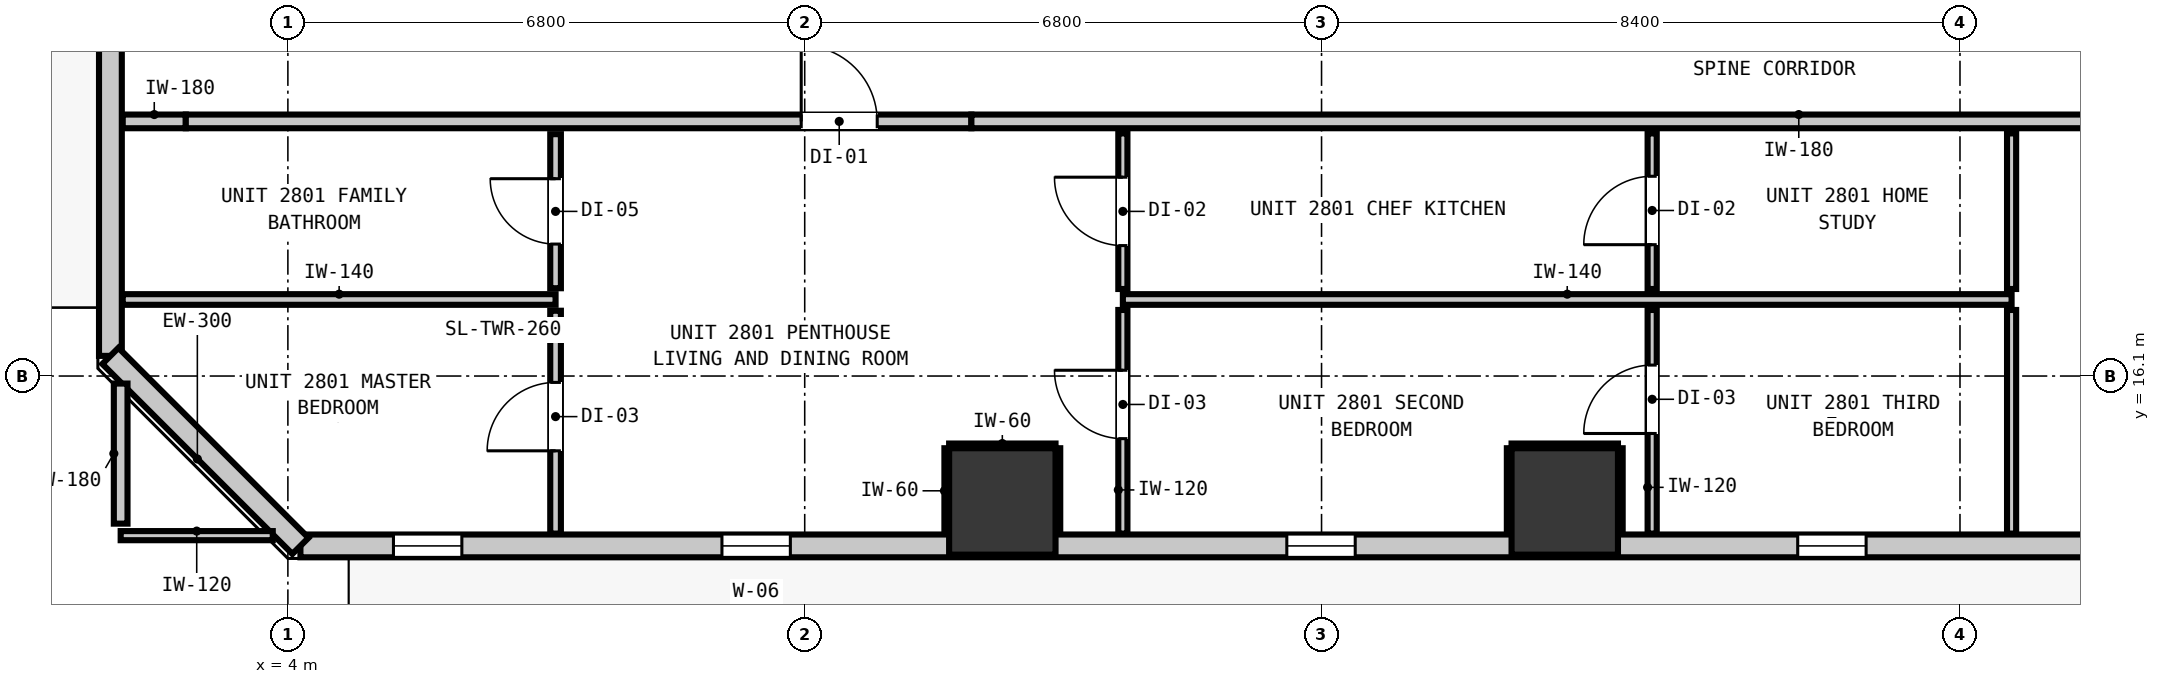
"""IFC4 building model, lengths in metres.
Left out: names, types, materials, properties, quantities, classifications, styles, units other than length and angle.
Written with IfcOpenShell. Run it as: python <this file> out.ifc"""

import sys

from ifc_helpers import new_model, si_unit, direction, frame, frame_2d, origin, origin_2d, place, context, subcontext, project, spatial, rectangle, extrude, element, fill, save


model = new_model("IFC4")
c1 = context("Model", 3, precision=1e-05, world=origin(), true_north=direction((0.0, 1.0)))
c2 = subcontext(c1, "Body", "Model", "MODEL_VIEW")
j1 = project(units=[si_unit("LENGTHUNIT", "METRE"), si_unit("PLANEANGLEUNIT", "RADIAN")], contexts=[c1])
p1 = place(None, origin())
s1 = spatial("IfcSite", under=j1, at=p1, CompositionType="ELEMENT")
p2 = place(p1, origin())
s2 = spatial("IfcBuilding", under=s1, at=p2, CompositionType="ELEMENT")
p3 = place(p2, frame((0.0, 0.0, 99.44)))
s3 = spatial("IfcBuildingStorey", under=s2, at=p3, CompositionType="ELEMENT", Elevation=99.44)
for number, where, z_axis, x_axis in (
    (1, (13.4, 14.45, 0.0), (0.0, 0.0, 1.0), (1.0, 0.0, 0.0)),
    (2, (20.8, 14.45, 0.0), (0.0, 0.0, 1.0), (1.0, 0.0, 0.0)),
):
    element("IfcColumn", number, at=place(p3, frame(where, z_axis=z_axis, x_axis=x_axis)), inside=s3, PredefinedType="COLUMN", context=c2, shape_type="SweptSolid", body=[
        extrude(rectangle(XDim=1.4, YDim=1.4, at=origin_2d()), origin(), (0.0, 0.0, 1.0), 3.32),
    ])
p4 = place(p3, frame((1.665, 16.365, 0.0), z_axis=(0.0, 0.0, 1.0), x_axis=(0.0, 1.0, 0.0)))
e3 = element("IfcWall", 3, at=p4, inside=s3, PredefinedType="STANDARD", context=c2, shape_type="SweptSolid", body=[
    extrude(rectangle(XDim=34.67, YDim=0.3, at=frame_2d((17.335, 0.0))), origin(), (0.0, 0.0, 1.0), 3.06),
])
p5 = place(p4, frame((8.955, 0.0, 0.0)))
e4 = element("IfcOpeningElement", 4, at=p5, cuts=e3, PredefinedType="OPENING", context=c2, shape_type="SweptSolid", body=[
    extrude(rectangle(XDim=1.0, YDim=2.15, at=frame_2d((0.5, 1.075))), frame((0.0, 0.16, 0.0), z_axis=(0.0, -1.0, 0.0), x_axis=(1.0, 0.0, 0.0)), (0.0, 0.0, 1.0), 0.32),
])
p6 = place(p4, frame((31.033, 0.0, 0.85)))
e5 = element("IfcOpeningElement", 5, at=p6, cuts=e3, PredefinedType="OPENING", context=c2, shape_type="SweptSolid", body=[
    extrude(rectangle(XDim=0.9, YDim=1.5, at=frame_2d((0.45, 0.75))), frame((0.0, 0.16, 0.0), z_axis=(0.0, -1.0, 0.0), x_axis=(1.0, 0.0, 0.0)), (0.0, 0.0, 1.0), 0.32),
])
p7 = place(p4, frame((10.955, 0.0, 0.85)))
e6 = element("IfcOpeningElement", 6, at=p7, cuts=e3, PredefinedType="OPENING", context=c2, shape_type="SweptSolid", body=[
    extrude(rectangle(XDim=0.9, YDim=1.5, at=frame_2d((0.45, 0.75))), frame((0.0, 0.16, 0.0), z_axis=(0.0, -1.0, 0.0), x_axis=(1.0, 0.0, 0.0)), (0.0, 0.0, 1.0), 0.32),
])
p8 = place(p4, frame((15.485, 0.0, 0.85)))
e7 = element("IfcOpeningElement", 7, at=p8, cuts=e3, PredefinedType="OPENING", context=c2, shape_type="SweptSolid", body=[
    extrude(rectangle(XDim=0.9, YDim=1.5, at=frame_2d((0.45, 0.75))), frame((0.0, 0.16, 0.0), z_axis=(0.0, -1.0, 0.0), x_axis=(1.0, 0.0, 0.0)), (0.0, 0.0, 1.0), 0.32),
])
p9 = place(p3, frame((41.635, 13.865, 0.0), z_axis=(0.0, 0.0, 1.0), x_axis=(-1.0, 0.0, 0.0)))
e8 = element("IfcWall", 8, at=p9, inside=s3, PredefinedType="STANDARD", context=c2, shape_type="SweptSolid", body=[
    extrude(rectangle(XDim=37.47, YDim=0.3, at=frame_2d((18.735, 0.0))), origin(), (0.0, 0.0, 1.0), 3.06),
])
p10 = place(p9, frame((0.901, 0.0, 0.0)))
e9 = element("IfcOpeningElement", 9, at=p10, cuts=e8, PredefinedType="OPENING", context=c2, shape_type="SweptSolid", body=[
    extrude(rectangle(XDim=1.0, YDim=2.15, at=frame_2d((0.5, 1.075))), frame((0.0, 0.16, 0.0), z_axis=(0.0, -1.0, 0.0), x_axis=(1.0, 0.0, 0.0)), (0.0, 0.0, 1.0), 0.32),
])
p11 = place(p9, frame((31.024, 0.0, 0.85)))
e10 = element("IfcOpeningElement", 10, at=p11, cuts=e8, PredefinedType="OPENING", context=c2, shape_type="SweptSolid", body=[
    extrude(rectangle(XDim=0.9, YDim=1.5, at=frame_2d((0.45, 0.75))), frame((0.0, 0.16, 0.0), z_axis=(0.0, -1.0, 0.0), x_axis=(1.0, 0.0, 0.0)), (0.0, 0.0, 1.0), 0.32),
])
p12 = place(p9, frame((35.346, 0.0, 0.85)))
e11 = element("IfcOpeningElement", 11, at=p12, cuts=e8, PredefinedType="OPENING", context=c2, shape_type="SweptSolid", body=[
    extrude(rectangle(XDim=0.9, YDim=1.5, at=frame_2d((0.45, 0.75))), frame((0.0, 0.16, 0.0), z_axis=(0.0, -1.0, 0.0), x_axis=(1.0, 0.0, 0.0)), (0.0, 0.0, 1.0), 0.32),
])
p13 = place(p9, frame((23.592, 0.0, 0.85)))
e12 = element("IfcOpeningElement", 12, at=p13, cuts=e8, PredefinedType="OPENING", context=c2, shape_type="SweptSolid", body=[
    extrude(rectangle(XDim=0.9, YDim=1.5, at=frame_2d((0.45, 0.75))), frame((0.0, 0.16, 0.0), z_axis=(0.0, -1.0, 0.0), x_axis=(1.0, 0.0, 0.0)), (0.0, 0.0, 1.0), 0.32),
])
p14 = place(p9, frame((16.87, 0.0, 0.85)))
e13 = element("IfcOpeningElement", 13, at=p14, cuts=e8, PredefinedType="OPENING", context=c2, shape_type="SweptSolid", body=[
    extrude(rectangle(XDim=0.9, YDim=1.5, at=frame_2d((0.45, 0.75))), frame((0.0, 0.16, 0.0), z_axis=(0.0, -1.0, 0.0), x_axis=(1.0, 0.0, 0.0)), (0.0, 0.0, 1.0), 0.32),
])
p15 = place(p9, frame((8.335, 0.0, 0.85)))
e14 = element("IfcOpeningElement", 14, at=p15, cuts=e8, PredefinedType="OPENING", context=c2, shape_type="SweptSolid", body=[
    extrude(rectangle(XDim=0.9, YDim=1.5, at=frame_2d((0.45, 0.75))), frame((0.0, 0.16, 0.0), z_axis=(0.0, -1.0, 0.0), x_axis=(1.0, 0.0, 0.0)), (0.0, 0.0, 1.0), 0.32),
])
p16 = place(p3, frame((4.165, 13.865, 0.0), z_axis=(0.0, 0.0, 1.0), x_axis=(-0.707106781187, 0.707106781187, 0.0)))
e15 = element("IfcWall", 15, at=p16, inside=s3, PredefinedType="STANDARD", context=c2, shape_type="SweptSolid", body=[
    extrude(rectangle(XDim=3.536, YDim=0.3, at=frame_2d((1.768, 0.0))), origin(), (0.0, 0.0, 1.0), 3.06),
])
p17 = place(p3, frame((1.827, 19.45, 0.0), z_axis=(0.0, 0.0, 1.0), x_axis=(1.0, 0.0, 0.0)))
e16 = element("IfcWall", 16, at=p17, inside=s3, PredefinedType="PARTITIONING", context=c2, shape_type="SweptSolid", body=[
    extrude(rectangle(XDim=0.83, YDim=0.18, at=frame_2d((0.415, 0.0))), origin(), (0.0, 0.0, 1.0), 3.06),
])
p18 = place(p3, frame((2.657, 19.45, 0.0), z_axis=(0.0, 0.0, 1.0), x_axis=(1.0, 0.0, 0.0)))
e17 = element("IfcWall", 17, at=p18, inside=s3, PredefinedType="PARTITIONING", context=c2, shape_type="SweptSolid", body=[
    extrude(rectangle(XDim=10.336, YDim=0.18, at=frame_2d((5.168, 0.0))), origin(), (0.0, 0.0, 1.0), 2.445),
])
p19 = place(p18, frame((8.097, 0.0, 0.0)))
e18 = element("IfcOpeningElement", 18, at=p19, cuts=e17, PredefinedType="OPENING", context=c2, shape_type="SweptSolid", body=[
    extrude(rectangle(XDim=1.0, YDim=2.15, at=frame_2d((0.5, 1.075))), frame((0.0, 0.1, 0.0), z_axis=(0.0, -1.0, 0.0), x_axis=(1.0, 0.0, 0.0)), (0.0, 0.0, 1.0), 0.2),
])
p20 = place(p3, frame((12.993, 19.45, 0.0), z_axis=(0.0, 0.0, 1.0), x_axis=(1.0, 0.0, 0.0)))
e19 = element("IfcWall", 19, at=p20, inside=s3, PredefinedType="PARTITIONING", context=c2, shape_type="SweptSolid", body=[
    extrude(rectangle(XDim=30.98, YDim=0.18, at=frame_2d((15.49, 0.0))), origin(), (0.0, 0.0, 1.0), 3.06),
])
p21 = place(p20, frame((21.872, 0.0, 0.0)))
e20 = element("IfcOpeningElement", 20, at=p21, cuts=e19, PredefinedType="OPENING", context=c2, shape_type="SweptSolid", body=[
    extrude(rectangle(XDim=0.9, YDim=2.1, at=frame_2d((0.45, 1.05))), frame((0.0, 0.1, 0.0), z_axis=(0.0, -1.0, 0.0), x_axis=(1.0, 0.0, 0.0)), (0.0, 0.0, 1.0), 0.2),
])
p22 = place(p3, frame((1.827, 17.107, 0.0), z_axis=(0.0, 0.0, 1.0), x_axis=(1.0, 0.0, 0.0)))
e21 = element("IfcWall", 21, at=p22, inside=s3, PredefinedType="PARTITIONING", context=c2, shape_type="SweptSolid", body=[
    extrude(rectangle(XDim=5.695, YDim=0.14, at=frame_2d((2.848, 0.0))), origin(), (0.0, 0.0, 1.0), 3.06),
])
p23 = place(p3, frame((14.986, 17.107, 0.0), z_axis=(0.0, 0.0, 1.0), x_axis=(1.0, 0.0, 0.0)))
e22 = element("IfcWall", 22, at=p23, inside=s3, PredefinedType="PARTITIONING", context=c2, shape_type="SweptSolid", body=[
    extrude(rectangle(XDim=11.693, YDim=0.14, at=frame_2d((5.846, 0.0))), origin(), (0.0, 0.0, 1.0), 3.06),
])
p24 = place(p3, frame((1.8, 14.0, 0.0), z_axis=(0.0, 0.0, 1.0), x_axis=(1.0, 0.0, 0.0)))
e23 = element("IfcWall", 23, at=p24, inside=s3, PredefinedType="PARTITIONING", context=c2, shape_type="SweptSolid", body=[
    extrude(rectangle(XDim=2.001, YDim=0.12, at=frame_2d((1.0, 0.0))), origin(), (0.0, 0.0, 1.0), 3.06),
])
p25 = place(p3, frame((1.8, 14.158, 0.0), z_axis=(0.0, 0.0, 1.0), x_axis=(0.0, 1.0, 0.0)))
e24 = element("IfcWall", 24, at=p25, inside=s3, PredefinedType="PARTITIONING", context=c2, shape_type="SweptSolid", body=[
    extrude(rectangle(XDim=1.843, YDim=0.18, at=frame_2d((0.921, 0.0))), origin(), (0.0, 0.0, 1.0), 3.06),
])
p26 = place(p3, frame((7.522, 14.027, 0.0), z_axis=(0.0, 0.0, 1.0), x_axis=(0.0, 1.0, 0.0)))
e25 = element("IfcWall", 25, at=p26, inside=s3, PredefinedType="PARTITIONING", context=c2, shape_type="SweptSolid", body=[
    extrude(rectangle(XDim=2.932, YDim=0.14, at=frame_2d((1.466, 0.0))), origin(), (0.0, 0.0, 1.0), 3.06),
])
p27 = place(p26, frame((1.089, 0.0, 0.0)))
e26 = element("IfcOpeningElement", 26, at=p27, cuts=e25, PredefinedType="OPENING", context=c2, shape_type="SweptSolid", body=[
    extrude(rectangle(XDim=0.9, YDim=2.1, at=frame_2d((0.45, 1.05))), frame((0.0, 0.08, 0.0), z_axis=(0.0, -1.0, 0.0), x_axis=(1.0, 0.0, 0.0)), (0.0, 0.0, 1.0), 0.16),
])
p28 = place(p3, frame((7.522, 17.255, 0.0), z_axis=(0.0, 0.0, 1.0), x_axis=(0.0, 1.0, 0.0)))
e27 = element("IfcWall", 27, at=p28, inside=s3, PredefinedType="PARTITIONING", context=c2, shape_type="SweptSolid", body=[
    extrude(rectangle(XDim=2.027, YDim=0.14, at=frame_2d((1.014, 0.0))), origin(), (0.0, 0.0, 1.0), 3.06),
])
p29 = place(p28, frame((0.581, 0.0, 0.0)))
e28 = element("IfcOpeningElement", 28, at=p29, cuts=e27, PredefinedType="OPENING", context=c2, shape_type="SweptSolid", body=[
    extrude(rectangle(XDim=0.86, YDim=2.02, at=frame_2d((0.43, 1.01))), frame((0.0, 0.08, 0.0), z_axis=(0.0, -1.0, 0.0), x_axis=(1.0, 0.0, 0.0)), (0.0, 0.0, 1.0), 0.16),
])
p30 = place(p3, frame((14.986, 14.027, 0.0), z_axis=(0.0, 0.0, 1.0), x_axis=(0.0, 1.0, 0.0)))
e29 = element("IfcWall", 29, at=p30, inside=s3, PredefinedType="PARTITIONING", context=c2, shape_type="SweptSolid", body=[
    extrude(rectangle(XDim=2.942, YDim=0.12, at=frame_2d((1.471, 0.0))), origin(), (0.0, 0.0, 1.0), 3.06),
])
p31 = place(p30, frame((1.249, 0.0, 0.0)))
e30 = element("IfcOpeningElement", 30, at=p31, cuts=e29, PredefinedType="OPENING", context=c2, shape_type="SweptSolid", body=[
    extrude(rectangle(XDim=0.9, YDim=2.1, at=frame_2d((0.45, 1.05))), frame((0.0, 0.07, 0.0), z_axis=(0.0, -1.0, 0.0), x_axis=(1.0, 0.0, 0.0)), (0.0, 0.0, 1.0), 0.14),
])
p32 = place(p3, frame((14.986, 17.245, 0.0), z_axis=(0.0, 0.0, 1.0), x_axis=(0.0, 1.0, 0.0)))
e31 = element("IfcWall", 31, at=p32, inside=s3, PredefinedType="PARTITIONING", context=c2, shape_type="SweptSolid", body=[
    extrude(rectangle(XDim=2.047, YDim=0.12, at=frame_2d((1.023, 0.0))), origin(), (0.0, 0.0, 1.0), 3.06),
])
p33 = place(p32, frame((0.571, 0.0, 0.0)))
e32 = element("IfcOpeningElement", 32, at=p33, cuts=e31, PredefinedType="OPENING", context=c2, shape_type="SweptSolid", body=[
    extrude(rectangle(XDim=0.9, YDim=2.1, at=frame_2d((0.45, 1.05))), frame((0.0, 0.07, 0.0), z_axis=(0.0, -1.0, 0.0), x_axis=(1.0, 0.0, 0.0)), (0.0, 0.0, 1.0), 0.14),
])
p34 = place(p3, frame((21.95, 14.027, 0.0), z_axis=(0.0, 0.0, 1.0), x_axis=(0.0, 1.0, 0.0)))
e33 = element("IfcWall", 33, at=p34, inside=s3, PredefinedType="PARTITIONING", context=c2, shape_type="SweptSolid", body=[
    extrude(rectangle(XDim=2.942, YDim=0.12, at=frame_2d((1.471, 0.0))), origin(), (0.0, 0.0, 1.0), 3.06),
])
p35 = place(p34, frame((1.317, 0.0, 0.0)))
e34 = element("IfcOpeningElement", 34, at=p35, cuts=e33, PredefinedType="OPENING", context=c2, shape_type="SweptSolid", body=[
    extrude(rectangle(XDim=0.9, YDim=2.1, at=frame_2d((0.45, 1.05))), frame((0.0, 0.07, 0.0), z_axis=(0.0, -1.0, 0.0), x_axis=(1.0, 0.0, 0.0)), (0.0, 0.0, 1.0), 0.14),
])
p36 = place(p3, frame((21.95, 17.245, 0.0), z_axis=(0.0, 0.0, 1.0), x_axis=(0.0, 1.0, 0.0)))
e35 = element("IfcWall", 35, at=p36, inside=s3, PredefinedType="PARTITIONING", context=c2, shape_type="SweptSolid", body=[
    extrude(rectangle(XDim=2.047, YDim=0.12, at=frame_2d((1.023, 0.0))), origin(), (0.0, 0.0, 1.0), 3.06),
])
p37 = place(p36, frame((0.583, 0.0, 0.0)))
e36 = element("IfcOpeningElement", 36, at=p37, cuts=e35, PredefinedType="OPENING", context=c2, shape_type="SweptSolid", body=[
    extrude(rectangle(XDim=0.9, YDim=2.1, at=frame_2d((0.45, 1.05))), frame((0.0, 0.07, 0.0), z_axis=(0.0, -1.0, 0.0), x_axis=(1.0, 0.0, 0.0)), (0.0, 0.0, 1.0), 0.14),
])
p38 = place(p3, frame((26.679, 14.027, 0.0), z_axis=(0.0, 0.0, 1.0), x_axis=(0.0, 1.0, 0.0)))
e37 = element("IfcWall", 37, at=p38, inside=s3, PredefinedType="PARTITIONING", context=c2, shape_type="SweptSolid", body=[
    extrude(rectangle(XDim=2.942, YDim=0.12, at=frame_2d((1.471, 0.0))), origin(), (0.0, 0.0, 1.0), 3.06),
])
p39 = place(p3, frame((26.679, 17.245, 0.0), z_axis=(0.0, 0.0, 1.0), x_axis=(0.0, 1.0, 0.0)))
e38 = element("IfcWall", 38, at=p39, inside=s3, PredefinedType="PARTITIONING", context=c2, shape_type="SweptSolid", body=[
    extrude(rectangle(XDim=2.047, YDim=0.12, at=frame_2d((1.023, 0.0))), origin(), (0.0, 0.0, 1.0), 3.06),
])
p40 = place(p3, frame((12.7, 15.182, 0.0), z_axis=(0.0, 0.0, 1.0), x_axis=(1.0, 0.0, 0.0)))
e39 = element("IfcWall", 39, at=p40, inside=s3, PredefinedType="PARTITIONING", context=c2, shape_type="SweptSolid", body=[
    extrude(rectangle(XDim=1.4, YDim=0.06, at=frame_2d((0.7, 0.0))), origin(), (0.0, 0.0, 1.0), 1.45),
])
for number, where, z_axis, x_axis in (
    (40, (12.668, 14.03, 0.0), (0.0, 0.0, 1.0), (0.0, 1.0, 0.0)),
    (41, (14.132, 14.03, 0.0), (0.0, 0.0, 1.0), (0.0, 1.0, 0.0)),
):
    element("IfcWall", number, at=place(p3, frame(where, z_axis=z_axis, x_axis=x_axis)), inside=s3, PredefinedType="PARTITIONING", context=c2, shape_type="SweptSolid", body=[
        extrude(rectangle(XDim=1.12, YDim=0.06, at=frame_2d((0.56, 0.0))), origin(), (0.0, 0.0, 1.0), 1.45),
    ])
p41 = place(p3, frame((20.1, 15.182, 0.0), z_axis=(0.0, 0.0, 1.0), x_axis=(1.0, 0.0, 0.0)))
e42 = element("IfcWall", 42, at=p41, inside=s3, PredefinedType="PARTITIONING", context=c2, shape_type="SweptSolid", body=[
    extrude(rectangle(XDim=1.4, YDim=0.06, at=frame_2d((0.7, 0.0))), origin(), (0.0, 0.0, 1.0), 1.45),
])
for number, where, z_axis, x_axis in (
    (43, (20.068, 14.03, 0.0), (0.0, 0.0, 1.0), (0.0, 1.0, 0.0)),
    (44, (21.532, 14.03, 0.0), (0.0, 0.0, 1.0), (0.0, 1.0, 0.0)),
):
    element("IfcWall", number, at=place(p3, frame(where, z_axis=z_axis, x_axis=x_axis)), inside=s3, PredefinedType="PARTITIONING", context=c2, shape_type="SweptSolid", body=[
        extrude(rectangle(XDim=1.12, YDim=0.06, at=frame_2d((0.56, 0.0))), origin(), (0.0, 0.0, 1.0), 1.45),
    ])
p42 = place(p11, origin())
e45 = element("IfcWindow", 45, at=p42, inside=s3, PartitioningType="SINGLE_PANEL", PredefinedType="WINDOW", context=c2, shape_type="SweptSolid", body=[
    extrude(rectangle(XDim=0.9, YDim=1.5, at=frame_2d((0.45, 0.75))), frame((0.0, 0.03, 0.0), z_axis=(0.0, -1.0, 0.0), x_axis=(1.0, 0.0, 0.0)), (0.0, 0.0, 1.0), 0.06),
])
fill(e10, e45)
p43 = place(p12, origin())
e46 = element("IfcWindow", 46, at=p43, inside=s3, PartitioningType="SINGLE_PANEL", PredefinedType="WINDOW", context=c2, shape_type="SweptSolid", body=[
    extrude(rectangle(XDim=0.9, YDim=1.5, at=frame_2d((0.45, 0.75))), frame((0.0, 0.03, 0.0), z_axis=(0.0, -1.0, 0.0), x_axis=(1.0, 0.0, 0.0)), (0.0, 0.0, 1.0), 0.06),
])
fill(e11, e46)
p44 = place(p13, origin())
e47 = element("IfcWindow", 47, at=p44, inside=s3, PartitioningType="SINGLE_PANEL", PredefinedType="WINDOW", context=c2, shape_type="SweptSolid", body=[
    extrude(rectangle(XDim=0.9, YDim=1.5, at=frame_2d((0.45, 0.75))), frame((0.0, 0.03, 0.0), z_axis=(0.0, -1.0, 0.0), x_axis=(1.0, 0.0, 0.0)), (0.0, 0.0, 1.0), 0.06),
])
fill(e12, e47)
p45 = place(p14, origin())
e48 = element("IfcWindow", 48, at=p45, inside=s3, PartitioningType="SINGLE_PANEL", PredefinedType="WINDOW", context=c2, shape_type="SweptSolid", body=[
    extrude(rectangle(XDim=0.9, YDim=1.5, at=frame_2d((0.45, 0.75))), frame((0.0, 0.03, 0.0), z_axis=(0.0, -1.0, 0.0), x_axis=(1.0, 0.0, 0.0)), (0.0, 0.0, 1.0), 0.06),
])
fill(e13, e48)
p46 = place(p19, origin())
e49 = element("IfcDoor", 49, at=p46, inside=s3, OperationType="SINGLE_SWING_LEFT", PredefinedType="DOOR", context=c2, shape_type="SweptSolid", body=[
    extrude(rectangle(XDim=1.0, YDim=2.15, at=frame_2d((0.5, 1.075))), frame((0.0, 0.025, 0.0), z_axis=(0.0, -1.0, 0.0), x_axis=(1.0, 0.0, 0.0)), (0.0, 0.0, 1.0), 0.05),
])
fill(e18, e49)
p47 = place(p29, origin())
e50 = element("IfcDoor", 50, at=p47, inside=s3, OperationType="SINGLE_SWING_RIGHT", PredefinedType="DOOR", context=c2, shape_type="SweptSolid", body=[
    extrude(rectangle(XDim=0.86, YDim=2.02, at=frame_2d((0.43, 1.01))), frame((0.0, 0.025, 0.0), z_axis=(0.0, -1.0, 0.0), x_axis=(1.0, 0.0, 0.0)), (0.0, 0.0, 1.0), 0.05),
])
fill(e28, e50)
p48 = place(p27, origin())
e51 = element("IfcDoor", 51, at=p48, inside=s3, OperationType="SINGLE_SWING_LEFT", PredefinedType="DOOR", context=c2, shape_type="SweptSolid", body=[
    extrude(rectangle(XDim=0.9, YDim=2.1, at=frame_2d((0.45, 1.05))), frame((0.0, 0.025, 0.0), z_axis=(0.0, -1.0, 0.0), x_axis=(1.0, 0.0, 0.0)), (0.0, 0.0, 1.0), 0.05),
])
fill(e26, e51)
p49 = place(p33, origin())
e52 = element("IfcDoor", 52, at=p49, inside=s3, OperationType="SINGLE_SWING_RIGHT", PredefinedType="DOOR", context=c2, shape_type="SweptSolid", body=[
    extrude(rectangle(XDim=0.9, YDim=2.1, at=frame_2d((0.45, 1.05))), frame((0.0, 0.025, 0.0), z_axis=(0.0, -1.0, 0.0), x_axis=(1.0, 0.0, 0.0)), (0.0, 0.0, 1.0), 0.05),
])
fill(e32, e52)
p50 = place(p37, origin())
e53 = element("IfcDoor", 53, at=p50, inside=s3, OperationType="SINGLE_SWING_LEFT", PredefinedType="DOOR", context=c2, shape_type="SweptSolid", body=[
    extrude(rectangle(XDim=0.9, YDim=2.1, at=frame_2d((0.45, 1.05))), frame((0.0, 0.025, 0.0), z_axis=(0.0, -1.0, 0.0), x_axis=(1.0, 0.0, 0.0)), (0.0, 0.0, 1.0), 0.05),
])
fill(e36, e53)
p51 = place(p31, origin())
e54 = element("IfcDoor", 54, at=p51, inside=s3, OperationType="SINGLE_SWING_RIGHT", PredefinedType="DOOR", context=c2, shape_type="SweptSolid", body=[
    extrude(rectangle(XDim=0.9, YDim=2.1, at=frame_2d((0.45, 1.05))), frame((0.0, 0.025, 0.0), z_axis=(0.0, -1.0, 0.0), x_axis=(1.0, 0.0, 0.0)), (0.0, 0.0, 1.0), 0.05),
])
fill(e30, e54)
p52 = place(p35, origin())
e55 = element("IfcDoor", 55, at=p52, inside=s3, OperationType="SINGLE_SWING_LEFT", PredefinedType="DOOR", context=c2, shape_type="SweptSolid", body=[
    extrude(rectangle(XDim=0.9, YDim=2.1, at=frame_2d((0.45, 1.05))), frame((0.0, 0.025, 0.0), z_axis=(0.0, -1.0, 0.0), x_axis=(1.0, 0.0, 0.0)), (0.0, 0.0, 1.0), 0.05),
])
fill(e34, e55)
save(model, sys.argv[1])
